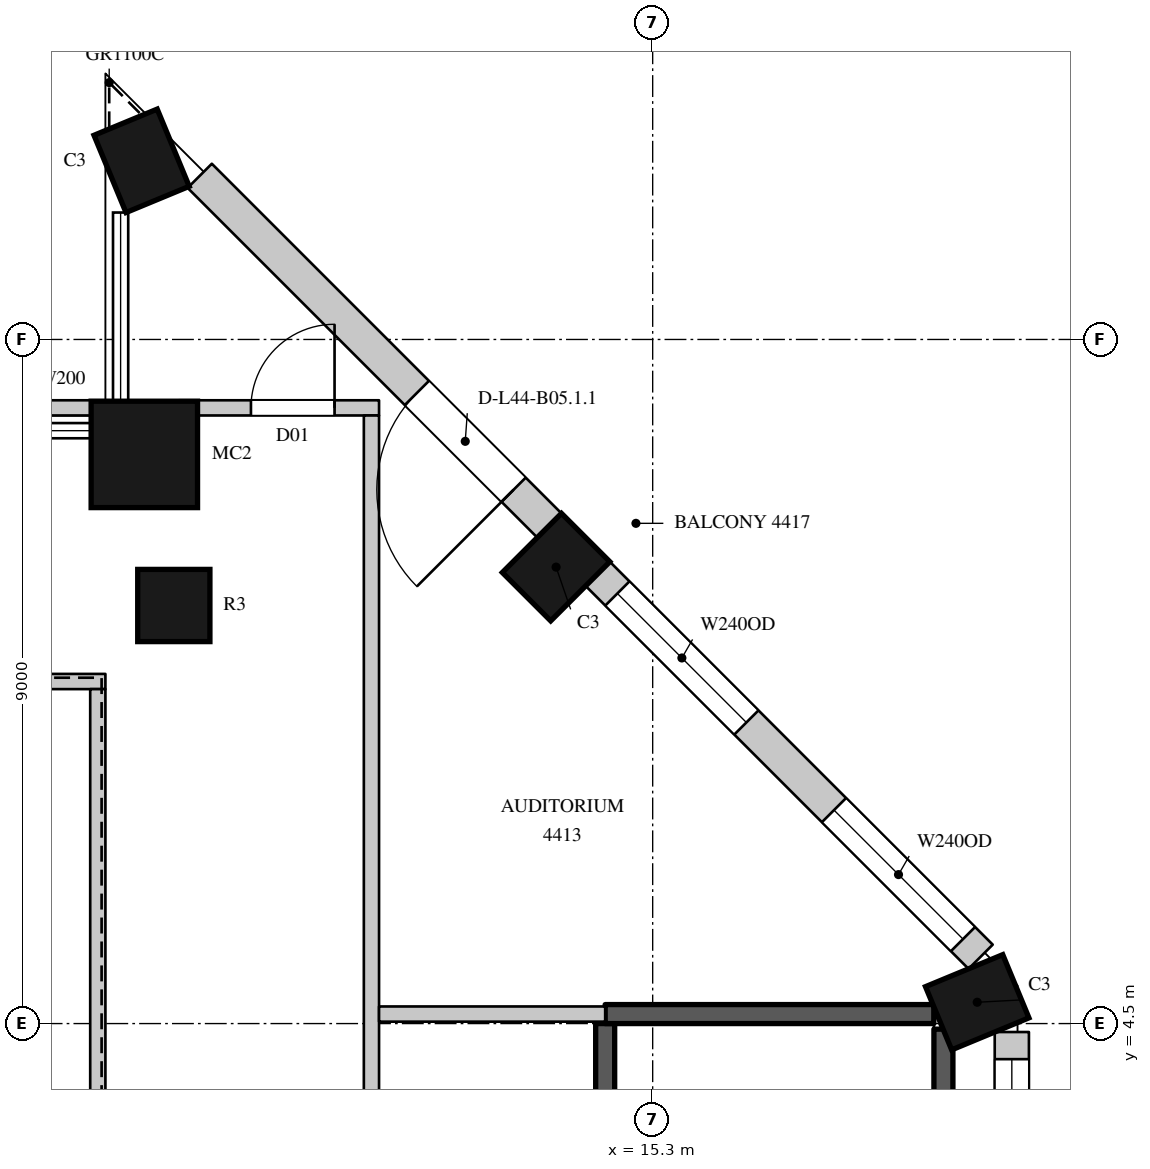
"""IFC4 building model, lengths in metres.
Left out: names, types, materials, properties, quantities, classifications, styles, units other than length and angle.
Written with IfcOpenShell. Run it as: python <this file> out.ifc"""

import sys

from ifc_helpers import new_model, si_unit, direction, frame, frame_2d, origin, origin_2d, place, context, subcontext, project, spatial, rectangle, circle, extrude, element, fill, save


model = new_model("IFC4")
c1 = context("Model", 3, precision=1e-05, world=origin(), true_north=direction((0.0, 1.0)))
c2 = subcontext(c1, "Body", "Model", "MODEL_VIEW")
j1 = project(units=[si_unit("LENGTHUNIT", "METRE"), si_unit("PLANEANGLEUNIT", "RADIAN")], contexts=[c1])
p1 = place(None, origin())
s1 = spatial("IfcSite", under=j1, at=p1, CompositionType="ELEMENT")
p2 = place(p1, origin())
s2 = spatial("IfcBuilding", under=s1, at=p2, CompositionType="ELEMENT")
p3 = place(p2, frame((0.0, 0.0, 201.5)))
s3 = spatial("IfcBuildingStorey", under=s2, at=p3, CompositionType="ELEMENT", Elevation=201.5)
for number, where, z_axis, x_axis in (
    (1, (19.57, 4.78, 0.0), (0.0, 0.0, 1.0), (-0.383, 0.924, 0.0)),
    (2, (14.029, 10.505, 0.0), (0.0, 0.0, 1.0), (-0.707, 0.707, 0.0)),
    (3, (8.576, 15.85, 0.0), (0.0, 0.0, 1.0), (-0.924, -0.383, 0.0)),
):
    element("IfcColumn", number, at=place(p3, frame(where, z_axis=z_axis, x_axis=x_axis)), inside=s3, PredefinedType="COLUMN", context=c2, shape_type="SweptSolid", body=[
        extrude(rectangle(XDim=0.9, YDim=1.1, at=origin_2d()), origin(), (0.0, 0.0, 1.0), 4.1),
    ])
p4 = place(p3, frame((8.612, 11.988, 0.0), z_axis=(0.0, 0.0, 1.0), x_axis=(1.0, 0.0, 0.0)))
e4 = element("IfcColumn", 4, at=p4, inside=s3, PredefinedType="COLUMN", context=c2, shape_type="SweptSolid", body=[
    extrude(circle(Radius=0.7, at=origin_2d()), origin(), (0.0, 0.0, 1.0), 4.1),
])
p5 = place(p3, frame((9.0, 10.0, 0.0), z_axis=(0.0, 0.0, 1.0), x_axis=(1.0, 0.0, 0.0)))
e5 = element("IfcColumn", 5, at=p5, inside=s3, PredefinedType="COLUMN", context=c2, shape_type="SweptSolid", body=[
    extrude(circle(Radius=0.475, at=origin_2d()), origin(), (0.0, 0.0, 1.0), 4.1),
])
p6 = place(p3, frame((20.025, -4.05, 0.0), z_axis=(0.0, 0.0, 1.0), x_axis=(0.0, 1.0, 0.0)))
e6 = element("IfcWall", 6, at=p6, inside=s3, PredefinedType="SOLIDWALL", context=c2, shape_type="SweptSolid", body=[
    extrude(rectangle(XDim=8.439, YDim=0.45, at=frame_2d((4.219, 0.0))), origin(), (0.0, 0.0, 1.0), 3.8),
])
p7 = place(p6, frame((0.394, 0.0, 1.05)))
e7 = element("IfcOpeningElement", 7, at=p7, cuts=e6, PredefinedType="OPENING", context=c2, shape_type="SweptSolid", body=[
    extrude(rectangle(XDim=3.0, YDim=2.4, at=frame_2d((1.5, 1.2))), frame((0.0, 0.235, 0.0), z_axis=(0.0, -1.0, 0.0), x_axis=(1.0, 0.0, 0.0)), (0.0, 0.0, 1.0), 0.47),
])
p8 = place(p6, frame((5.082, 0.0, 1.05)))
e8 = element("IfcOpeningElement", 8, at=p8, cuts=e6, PredefinedType="OPENING", context=c2, shape_type="SweptSolid", body=[
    extrude(rectangle(XDim=3.0, YDim=2.4, at=frame_2d((1.5, 1.2))), frame((0.0, 0.235, 0.0), z_axis=(0.0, -1.0, 0.0), x_axis=(1.0, 0.0, 0.0)), (0.0, 0.0, 1.0), 0.47),
])
p9 = place(p3, frame((19.615, 5.379, 0.0), z_axis=(0.0, 0.0, 1.0), x_axis=(-0.707089646058, 0.7071239159, 0.0)))
e9 = element("IfcWall", 9, at=p9, inside=s3, PredefinedType="SOLIDWALL", context=c2, shape_type="SweptSolid", body=[
    extrude(rectangle(XDim=7.124, YDim=0.45, at=frame_2d((3.562, 0.0))), origin(), (0.0, 0.0, 1.0), 3.8),
])
p10 = place(p9, frame((0.328, 0.0, 1.05)))
e10 = element("IfcOpeningElement", 10, at=p10, cuts=e9, PredefinedType="OPENING", context=c2, shape_type="SweptSolid", body=[
    extrude(rectangle(XDim=2.4, YDim=2.4, at=frame_2d((1.2, 1.2))), frame((0.0, 0.235, 0.0), z_axis=(0.0, -1.0, 0.0), x_axis=(1.0, 0.0, 0.0)), (0.0, 0.0, 1.0), 0.47),
])
p11 = place(p9, frame((4.359, 0.0, 1.05)))
e11 = element("IfcOpeningElement", 11, at=p11, cuts=e9, PredefinedType="OPENING", context=c2, shape_type="SweptSolid", body=[
    extrude(rectangle(XDim=2.4, YDim=2.4, at=frame_2d((1.2, 1.2))), frame((0.0, 0.235, 0.0), z_axis=(0.0, -1.0, 0.0), x_axis=(1.0, 0.0, 0.0)), (0.0, 0.0, 1.0), 0.47),
])
p12 = place(p3, frame((13.941, 11.053, 0.0), z_axis=(0.0, 0.0, 1.0), x_axis=(-0.707106781187, 0.707106781187, 0.0)))
e12 = element("IfcWall", 12, at=p12, inside=s3, PredefinedType="SOLIDWALL", context=c2, shape_type="SweptSolid", body=[
    extrude(rectangle(XDim=6.505, YDim=0.45, at=frame_2d((3.252, 0.0))), origin(), (0.0, 0.0, 1.0), 3.8),
])
p13 = place(p12, frame((0.665, 0.0, 0.0)))
e13 = element("IfcOpeningElement", 13, at=p13, cuts=e12, PredefinedType="OPENING", context=c2, shape_type="SweptSolid", body=[
    extrude(rectangle(XDim=1.8, YDim=2.4, at=frame_2d((0.9, 1.2))), frame((0.0, 0.235, 0.0), z_axis=(0.0, -1.0, 0.0), x_axis=(1.0, 0.0, 0.0)), (0.0, 0.0, 1.0), 0.47),
])
p14 = place(p3, frame((4.52, 9.0, 0.0), z_axis=(0.0, 0.0, 1.0), x_axis=(1.0, 0.0, 0.0)))
e14 = element("IfcWall", 14, at=p14, inside=s3, PredefinedType="PARTITIONING", context=c2, shape_type="SweptSolid", body=[
    extrude(rectangle(XDim=3.58, YDim=0.2, at=frame_2d((1.79, 0.0))), origin(), (0.0, 0.0, 1.0), 3.8),
])
p15 = place(p3, frame((6.75, 12.6, 0.0), z_axis=(0.0, 0.0, 1.0), x_axis=(1.0, 0.0, 0.0)))
e15 = element("IfcWall", 15, at=p15, inside=s3, PredefinedType="PARTITIONING", context=c2, shape_type="SweptSolid", body=[
    extrude(rectangle(XDim=1.41, YDim=0.2, at=frame_2d((0.705, 0.0))), origin(), (0.0, 0.0, 1.0), 3.8),
])
p16 = place(p3, frame((8.0, -8.9, 0.0), z_axis=(0.0, 0.0, 1.0), x_axis=(0.0, 1.0, 0.0)))
e16 = element("IfcWall", 16, at=p16, inside=s3, PredefinedType="PARTITIONING", context=c2, shape_type="SweptSolid", body=[
    extrude(rectangle(XDim=17.8, YDim=0.2, at=frame_2d((8.9, 0.0))), origin(), (0.0, 0.0, 1.0), 3.8),
])
p17 = place(p3, frame((9.065, 12.6, 0.0), z_axis=(0.0, 0.0, 1.0), x_axis=(1.0, 0.0, 0.0)))
e17 = element("IfcWall", 17, at=p17, inside=s3, PredefinedType="PARTITIONING", context=c2, shape_type="SweptSolid", body=[
    extrude(rectangle(XDim=2.635, YDim=0.2, at=frame_2d((1.318, 0.0))), origin(), (0.0, 0.0, 1.0), 3.8),
])
p18 = place(p17, frame((0.95, 0.0, 0.0)))
e18 = element("IfcOpeningElement", 18, at=p18, cuts=e17, PredefinedType="OPENING", context=c2, shape_type="SweptSolid", body=[
    extrude(rectangle(XDim=1.1, YDim=2.4, at=frame_2d((0.55, 1.2))), frame((0.0, 0.11, 0.0), z_axis=(0.0, -1.0, 0.0), x_axis=(1.0, 0.0, 0.0)), (0.0, 0.0, 1.0), 0.22),
])
p19 = place(p3, frame((11.6, -12.6, 0.0), z_axis=(0.0, 0.0, 1.0), x_axis=(0.0, 1.0, 0.0)))
e19 = element("IfcWall", 19, at=p19, inside=s3, PredefinedType="PARTITIONING", context=c2, shape_type="SweptSolid", body=[
    extrude(rectangle(XDim=25.1, YDim=0.2, at=frame_2d((12.55, 0.0))), origin(), (0.0, 0.0, 1.0), 3.8),
])
p20 = place(p19, frame((10.45, 0.0, 0.0)))
e20 = element("IfcOpeningElement", 20, at=p20, cuts=e19, PredefinedType="OPENING", context=c2, shape_type="SweptSolid", body=[
    extrude(rectangle(XDim=1.5, YDim=2.4, at=frame_2d((0.75, 1.2))), frame((0.0, 0.11, 0.0), z_axis=(0.0, -1.0, 0.0), x_axis=(1.0, 0.0, 0.0)), (0.0, 0.0, 1.0), 0.22),
])
p21 = place(p19, frame((3.45, 0.0, 0.0)))
e21 = element("IfcOpeningElement", 21, at=p21, cuts=e19, PredefinedType="OPENING", context=c2, shape_type="SweptSolid", body=[
    extrude(rectangle(XDim=1.1, YDim=2.4, at=frame_2d((0.55, 1.2))), frame((0.0, 0.11, 0.0), z_axis=(0.0, -1.0, 0.0), x_axis=(1.0, 0.0, 0.0)), (0.0, 0.0, 1.0), 0.22),
])
p22 = place(p3, frame((11.7, 4.625, 0.0), z_axis=(0.0, 0.0, 1.0), x_axis=(1.0, 0.0, 0.0)))
e22 = element("IfcWall", 22, at=p22, inside=s3, PredefinedType="PARTITIONING", context=c2, shape_type="SweptSolid", body=[
    extrude(rectangle(XDim=2.975, YDim=0.2, at=frame_2d((1.488, 0.0))), origin(), (0.0, 0.0, 1.0), 3.8),
])
p23 = place(p3, frame((14.675, -4.5, 0.0), z_axis=(0.0, 0.0, 1.0), x_axis=(0.0, 1.0, 0.0)))
e23 = element("IfcWall", 23, at=p23, inside=s3, PredefinedType="SHEAR", context=c2, shape_type="SweptSolid", body=[
    extrude(rectangle(XDim=9.0, YDim=0.25, at=frame_2d((4.5, 0.0))), origin(), (0.0, 0.0, 1.0), 3.8),
])
p24 = place(p23, frame((0.45, 0.0, 0.0)))
e24 = element("IfcOpeningElement", 24, at=p24, cuts=e23, PredefinedType="OPENING", context=c2, shape_type="SweptSolid", body=[
    extrude(rectangle(XDim=1.1, YDim=2.2, at=frame_2d((0.55, 1.1))), frame((0.0, 0.135, 0.0), z_axis=(0.0, -1.0, 0.0), x_axis=(1.0, 0.0, 0.0)), (0.0, 0.0, 1.0), 0.27),
])
p25 = place(p3, frame((14.675, 4.625, 0.0), z_axis=(0.0, 0.0, 1.0), x_axis=(1.0, 0.0, 0.0)))
e25 = element("IfcWall", 25, at=p25, inside=s3, PredefinedType="SHEAR", context=c2, shape_type="SweptSolid", body=[
    extrude(rectangle(XDim=4.324, YDim=0.25, at=frame_2d((2.162, 0.0))), origin(), (0.0, 0.0, 1.0), 3.8),
])
p26 = place(p3, frame((19.125, -4.05, 0.0), z_axis=(0.0, 0.0, 1.0), x_axis=(0.0, 1.0, 0.0)))
e26 = element("IfcWall", 26, at=p26, inside=s3, PredefinedType="SHEAR", context=c2, shape_type="SweptSolid", body=[
    extrude(rectangle(XDim=8.477, YDim=0.25, at=frame_2d((4.238, 0.0))), origin(), (0.0, 0.0, 1.0), 3.8),
])
p27 = place(p8, origin())
e27 = element("IfcWindow", 27, at=p27, inside=s3, PartitioningType="SINGLE_PANEL", PredefinedType="WINDOW", context=c2, shape_type="SweptSolid", body=[
    extrude(rectangle(XDim=3.0, YDim=2.4, at=frame_2d((1.5, 1.2))), frame((0.0, 0.135, 0.0), z_axis=(0.0, -1.0, 0.0), x_axis=(1.0, 0.0, 0.0)), (0.0, 0.0, 1.0), 0.06),
])
fill(e8, e27)
p28 = place(p10, origin())
e28 = element("IfcWindow", 28, at=p28, inside=s3, PartitioningType="SINGLE_PANEL", PredefinedType="WINDOW", context=c2, shape_type="SweptSolid", body=[
    extrude(rectangle(XDim=2.4, YDim=2.4, at=frame_2d((1.2, 1.2))), frame((0.0, 0.135, 0.0), z_axis=(0.0, -1.0, 0.0), x_axis=(1.0, 0.0, 0.0)), (0.0, 0.0, 1.0), 0.06),
])
fill(e10, e28)
p29 = place(p11, origin())
e29 = element("IfcWindow", 29, at=p29, inside=s3, PartitioningType="SINGLE_PANEL", PredefinedType="WINDOW", context=c2, shape_type="SweptSolid", body=[
    extrude(rectangle(XDim=2.4, YDim=2.4, at=frame_2d((1.2, 1.2))), frame((0.0, 0.135, 0.0), z_axis=(0.0, -1.0, 0.0), x_axis=(1.0, 0.0, 0.0)), (0.0, 0.0, 1.0), 0.06),
])
fill(e11, e29)
p30 = place(p13, origin())
e30 = element("IfcDoor", 30, at=p30, inside=s3, OperationType="SLIDING_TO_LEFT", PredefinedType="DOOR", context=c2, shape_type="SweptSolid", body=[
    extrude(rectangle(XDim=1.8, YDim=2.4, at=frame_2d((0.9, 1.2))), frame((0.0, 0.13, 0.0), z_axis=(0.0, -1.0, 0.0), x_axis=(1.0, 0.0, 0.0)), (0.0, 0.0, 1.0), 0.05),
])
fill(e13, e30)
p31 = place(p18, origin())
e31 = element("IfcDoor", 31, at=p31, inside=s3, OperationType="SINGLE_SWING_RIGHT", PredefinedType="DOOR", context=c2, shape_type="SweptSolid", body=[
    extrude(rectangle(XDim=1.1, YDim=2.4, at=frame_2d((0.55, 1.2))), frame((0.0, 0.025, 0.0), z_axis=(0.0, -1.0, 0.0), x_axis=(1.0, 0.0, 0.0)), (0.0, 0.0, 1.0), 0.05),
])
fill(e18, e31)
save(model, sys.argv[1])
